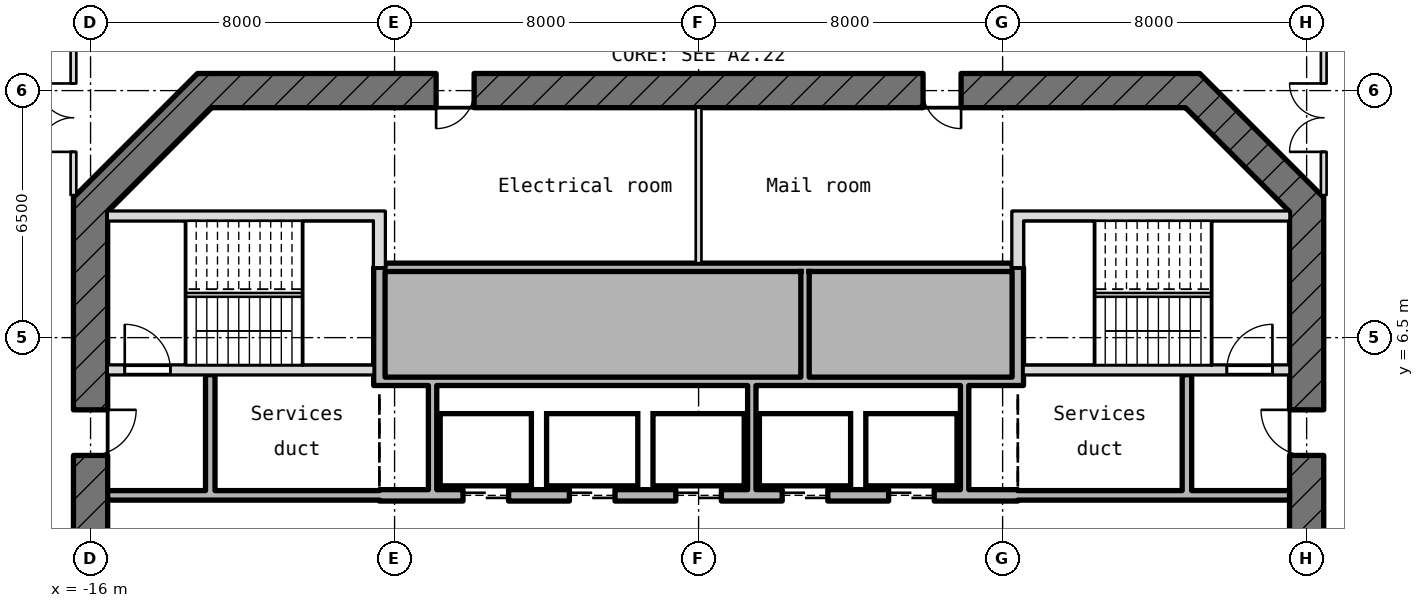
"""IFC4 building model, lengths in metres.
Left out: names, types, materials, properties, quantities, classifications, styles, units other than length and angle.
Written with IfcOpenShell. Run it as: python <this file> out.ifc"""

import sys

from ifc_helpers import new_model, si_unit, direction, frame, frame_2d, origin, place, context, subcontext, project, spatial, rectangle, extrude, element, fill, save


model = new_model("IFC4")
c1 = context("Model", 3, precision=1e-05, world=origin(), true_north=direction((0.0, 1.0)))
c2 = subcontext(c1, "Body", "Model", "MODEL_VIEW")
j1 = project(units=[si_unit("LENGTHUNIT", "METRE"), si_unit("PLANEANGLEUNIT", "RADIAN")], contexts=[c1])
p1 = place(None, origin())
s1 = spatial("IfcSite", under=j1, at=p1, CompositionType="ELEMENT")
p2 = place(p1, origin())
s2 = spatial("IfcBuilding", under=s1, at=p2, CompositionType="ELEMENT")
p3 = place(p2, frame((0.0, 0.0, 235.75)))
s3 = spatial("IfcBuildingStorey", under=s2, at=p3, CompositionType="ELEMENT", Elevation=235.75)
p4 = place(p3, frame((-15.003, 20.519, 0.0), z_axis=(0.0, 0.0, 1.0), x_axis=(-0.765786072148, -0.643095398603, 0.0)))
e1 = element("IfcWall", 1, at=p4, inside=s3, PredefinedType="SOLIDWALL", context=c2, shape_type="SweptSolid", body=[
    extrude(rectangle(XDim=10.897, YDim=0.3, at=frame_2d((5.448, 0.0))), origin(), (0.0, 0.0, 1.0), 3.97),
])
p5 = place(p4, frame((7.197, 0.0, 0.0)))
e2 = element("IfcOpeningElement", 2, at=p5, cuts=e1, PredefinedType="OPENING", context=c2, shape_type="SweptSolid", body=[
    extrude(rectangle(XDim=1.8, YDim=2.4, at=frame_2d((0.9, 1.2))), frame((0.0, 0.16, 0.0), z_axis=(0.0, -1.0, 0.0), x_axis=(1.0, 0.0, 0.0)), (0.0, 0.0, 1.0), 0.32),
])
p6 = place(p4, frame((4.597, 0.0, 0.9)))
e3 = element("IfcOpeningElement", 3, at=p6, cuts=e1, PredefinedType="OPENING", context=c2, shape_type="SweptSolid", body=[
    extrude(rectangle(XDim=2.0, YDim=1.5, at=frame_2d((1.0, 0.75))), frame((0.0, 0.16, 0.0), z_axis=(0.0, -1.0, 0.0), x_axis=(1.0, 0.0, 0.0)), (0.0, 0.0, 1.0), 0.32),
])
p7 = place(p3, frame((16.0, -10.186, -0.18), z_axis=(0.0, 0.0, 1.0), x_axis=(0.0, 1.0, 0.0)))
e4 = element("IfcWall", 4, at=p7, inside=s3, PredefinedType="SHEAR", context=c2, shape_type="SweptSolid", body=[
    extrude(rectangle(XDim=20.373, YDim=0.9, at=frame_2d((10.186, 0.0))), origin(), (0.0, 0.0, 1.0), 4.15),
])
p8 = place(p7, frame((8.986, 0.0, 0.18)))
e5 = element("IfcOpeningElement", 5, at=p8, cuts=e4, PredefinedType="OPENING", context=c2, shape_type="SweptSolid", body=[
    extrude(rectangle(XDim=2.4, YDim=2.1, at=frame_2d((1.2, 1.05))), frame((0.0, 0.46, 0.0), z_axis=(0.0, -1.0, 0.0), x_axis=(1.0, 0.0, 0.0)), (0.0, 0.0, 1.0), 0.92),
])
p9 = place(p7, frame((13.586, 0.0, 0.18)))
e6 = element("IfcOpeningElement", 6, at=p9, cuts=e4, PredefinedType="OPENING", context=c2, shape_type="SweptSolid", body=[
    extrude(rectangle(XDim=1.2, YDim=2.1, at=frame_2d((0.6, 1.05))), frame((0.0, 0.46, 0.0), z_axis=(0.0, -1.0, 0.0), x_axis=(1.0, 0.0, 0.0)), (0.0, 0.0, 1.0), 0.92),
])
p10 = place(p7, frame((2.4, 0.0, 0.18)))
e7 = element("IfcOpeningElement", 7, at=p10, cuts=e4, PredefinedType="OPENING", context=c2, shape_type="SweptSolid", body=[
    extrude(rectangle(XDim=1.2, YDim=2.1, at=frame_2d((0.6, 1.05))), frame((0.0, 0.46, 0.0), z_axis=(0.0, -1.0, 0.0), x_axis=(1.0, 0.0, 0.0)), (0.0, 0.0, 1.0), 0.92),
])
p11 = place(p3, frame((16.132, 9.868, -0.18), z_axis=(0.0, 0.0, 1.0), x_axis=(-0.707106781187, 0.707106781187, 0.0)))
e8 = element("IfcWall", 8, at=p11, inside=s3, PredefinedType="SHEAR", context=c2, shape_type="SweptSolid", body=[
    extrude(rectangle(XDim=4.615, YDim=0.9, at=frame_2d((2.308, 0.0))), origin(), (0.0, 0.0, 1.0), 4.15),
])
p12 = place(p3, frame((13.186, 13.0, -0.18), z_axis=(0.0, 0.0, 1.0), x_axis=(-1.0, 0.0, 0.0)))
e9 = element("IfcWall", 9, at=p12, inside=s3, PredefinedType="SHEAR", context=c2, shape_type="SweptSolid", body=[
    extrude(rectangle(XDim=26.373, YDim=0.9, at=frame_2d((13.186, 0.0))), origin(), (0.0, 0.0, 1.0), 4.15),
])
p13 = place(p12, frame((19.094, 0.0, 0.18)))
e10 = element("IfcOpeningElement", 10, at=p13, cuts=e9, PredefinedType="OPENING", context=c2, shape_type="SweptSolid", body=[
    extrude(rectangle(XDim=1.0, YDim=2.1, at=frame_2d((0.5, 1.05))), frame((0.0, 0.46, 0.0), z_axis=(0.0, -1.0, 0.0), x_axis=(1.0, 0.0, 0.0)), (0.0, 0.0, 1.0), 0.92),
])
p14 = place(p12, frame((6.279, 0.0, 0.18)))
e11 = element("IfcOpeningElement", 11, at=p14, cuts=e9, PredefinedType="OPENING", context=c2, shape_type="SweptSolid", body=[
    extrude(rectangle(XDim=1.0, YDim=2.1, at=frame_2d((0.5, 1.05))), frame((0.0, 0.46, 0.0), z_axis=(0.0, -1.0, 0.0), x_axis=(1.0, 0.0, 0.0)), (0.0, 0.0, 1.0), 0.92),
])
p15 = place(p3, frame((-12.868, 13.132, -0.18), z_axis=(0.0, 0.0, 1.0), x_axis=(-0.707106781187, -0.707106781187, 0.0)))
e12 = element("IfcWall", 12, at=p15, inside=s3, PredefinedType="SHEAR", context=c2, shape_type="SweptSolid", body=[
    extrude(rectangle(XDim=4.615, YDim=0.9, at=frame_2d((2.308, 0.0))), origin(), (0.0, 0.0, 1.0), 4.15),
])
p16 = place(p3, frame((-16.0, 10.186, -0.18), z_axis=(0.0, 0.0, 1.0), x_axis=(0.0, -1.0, 0.0)))
e13 = element("IfcWall", 13, at=p16, inside=s3, PredefinedType="SHEAR", context=c2, shape_type="SweptSolid", body=[
    extrude(rectangle(XDim=20.373, YDim=0.9, at=frame_2d((10.186, 0.0))), origin(), (0.0, 0.0, 1.0), 4.15),
])
p17 = place(p16, frame((8.986, 0.0, 0.18)))
e14 = element("IfcOpeningElement", 14, at=p17, cuts=e13, PredefinedType="OPENING", context=c2, shape_type="SweptSolid", body=[
    extrude(rectangle(XDim=2.4, YDim=2.1, at=frame_2d((1.2, 1.05))), frame((0.0, 0.46, 0.0), z_axis=(0.0, -1.0, 0.0), x_axis=(1.0, 0.0, 0.0)), (0.0, 0.0, 1.0), 0.92),
])
p18 = place(p16, frame((5.586, 0.0, 0.18)))
e15 = element("IfcOpeningElement", 15, at=p18, cuts=e13, PredefinedType="OPENING", context=c2, shape_type="SweptSolid", body=[
    extrude(rectangle(XDim=1.2, YDim=2.1, at=frame_2d((0.6, 1.05))), frame((0.0, 0.46, 0.0), z_axis=(0.0, -1.0, 0.0), x_axis=(1.0, 0.0, 0.0)), (0.0, 0.0, 1.0), 0.92),
])
p19 = place(p3, frame((-15.55, 2.35, 0.0), z_axis=(0.0, 0.0, 1.0), x_axis=(1.0, 0.0, 0.0)))
e16 = element("IfcWall", 16, at=p19, inside=s3, PredefinedType="STANDARD", context=c2, shape_type="SweptSolid", body=[
    extrude(rectangle(XDim=7.15, YDim=0.25, at=frame_2d((3.575, 0.0))), origin(), (0.0, 0.0, 1.0), 3.97),
])
p20 = place(p3, frame((-8.4, 2.35, -0.18), z_axis=(0.0, 0.0, 1.0), x_axis=(1.0, 0.0, 0.0)))
e17 = element("IfcWall", 17, at=p20, inside=s3, PredefinedType="SHEAR", context=c2, shape_type="SweptSolid", body=[
    extrude(rectangle(XDim=16.8, YDim=0.3, at=frame_2d((8.4, 0.0))), origin(), (0.0, 0.0, 1.0), 4.15),
])
p21 = place(p20, frame((2.2, 0.0, 0.18)))
e18 = element("IfcOpeningElement", 18, at=p21, cuts=e17, PredefinedType="OPENING", context=c2, shape_type="SweptSolid", body=[
    extrude(rectangle(XDim=1.2, YDim=2.1, at=frame_2d((0.6, 1.05))), frame((0.0, 0.16, 0.0), z_axis=(0.0, -1.0, 0.0), x_axis=(1.0, 0.0, 0.0)), (0.0, 0.0, 1.0), 0.32),
])
p22 = place(p20, frame((5.0, 0.0, 0.18)))
e19 = element("IfcOpeningElement", 19, at=p22, cuts=e17, PredefinedType="OPENING", context=c2, shape_type="SweptSolid", body=[
    extrude(rectangle(XDim=1.2, YDim=2.1, at=frame_2d((0.6, 1.05))), frame((0.0, 0.16, 0.0), z_axis=(0.0, -1.0, 0.0), x_axis=(1.0, 0.0, 0.0)), (0.0, 0.0, 1.0), 0.32),
])
p23 = place(p20, frame((7.8, 0.0, 0.18)))
e20 = element("IfcOpeningElement", 20, at=p23, cuts=e17, PredefinedType="OPENING", context=c2, shape_type="SweptSolid", body=[
    extrude(rectangle(XDim=1.2, YDim=2.1, at=frame_2d((0.6, 1.05))), frame((0.0, 0.16, 0.0), z_axis=(0.0, -1.0, 0.0), x_axis=(1.0, 0.0, 0.0)), (0.0, 0.0, 1.0), 0.32),
])
p24 = place(p20, frame((10.6, 0.0, 0.18)))
e21 = element("IfcOpeningElement", 21, at=p24, cuts=e17, PredefinedType="OPENING", context=c2, shape_type="SweptSolid", body=[
    extrude(rectangle(XDim=1.2, YDim=2.1, at=frame_2d((0.6, 1.05))), frame((0.0, 0.16, 0.0), z_axis=(0.0, -1.0, 0.0), x_axis=(1.0, 0.0, 0.0)), (0.0, 0.0, 1.0), 0.32),
])
p25 = place(p20, frame((13.4, 0.0, 0.18)))
e22 = element("IfcOpeningElement", 22, at=p25, cuts=e17, PredefinedType="OPENING", context=c2, shape_type="SweptSolid", body=[
    extrude(rectangle(XDim=1.2, YDim=2.1, at=frame_2d((0.6, 1.05))), frame((0.0, 0.16, 0.0), z_axis=(0.0, -1.0, 0.0), x_axis=(1.0, 0.0, 0.0)), (0.0, 0.0, 1.0), 0.32),
])
p26 = place(p3, frame((8.4, 2.35, 0.0), z_axis=(0.0, 0.0, 1.0), x_axis=(1.0, 0.0, 0.0)))
e23 = element("IfcWall", 23, at=p26, inside=s3, PredefinedType="STANDARD", context=c2, shape_type="SweptSolid", body=[
    extrude(rectangle(XDim=7.15, YDim=0.25, at=frame_2d((3.575, 0.0))), origin(), (0.0, 0.0, 1.0), 3.97),
])
p27 = place(p3, frame((-8.25, 5.35, 0.0), z_axis=(0.0, 0.0, 1.0), x_axis=(1.0, 0.0, 0.0)))
e24 = element("IfcWall", 24, at=p27, inside=s3, PredefinedType="STANDARD", context=c2, shape_type="SweptSolid", body=[
    extrude(rectangle(XDim=16.5, YDim=0.22, at=frame_2d((8.25, 0.0))), origin(), (0.0, 0.0, 1.0), 3.97),
])
p28 = place(p3, frame((-15.55, 5.65, -0.18), z_axis=(0.0, 0.0, 1.0), x_axis=(1.0, 0.0, 0.0)))
e25 = element("IfcWall", 25, at=p28, inside=s3, PredefinedType="SHEAR", context=c2, shape_type="SweptSolid", body=[
    extrude(rectangle(XDim=7.0, YDim=0.25, at=frame_2d((3.5, 0.0))), origin(), (0.0, 0.0, 1.0), 4.15),
])
p29 = place(p28, frame((0.45, 0.0, 0.18)))
e26 = element("IfcOpeningElement", 26, at=p29, cuts=e25, PredefinedType="OPENING", context=c2, shape_type="SweptSolid", body=[
    extrude(rectangle(XDim=1.2, YDim=2.1, at=frame_2d((0.6, 1.05))), frame((0.0, 0.135, 0.0), z_axis=(0.0, -1.0, 0.0), x_axis=(1.0, 0.0, 0.0)), (0.0, 0.0, 1.0), 0.27),
])
p30 = place(p3, frame((8.55, 5.65, -0.18), z_axis=(0.0, 0.0, 1.0), x_axis=(1.0, 0.0, 0.0)))
e27 = element("IfcWall", 27, at=p30, inside=s3, PredefinedType="SHEAR", context=c2, shape_type="SweptSolid", body=[
    extrude(rectangle(XDim=7.0, YDim=0.25, at=frame_2d((3.5, 0.0))), origin(), (0.0, 0.0, 1.0), 4.15),
])
p31 = place(p30, frame((5.35, 0.0, 0.18)))
e28 = element("IfcOpeningElement", 28, at=p31, cuts=e27, PredefinedType="OPENING", context=c2, shape_type="SweptSolid", body=[
    extrude(rectangle(XDim=1.2, YDim=2.1, at=frame_2d((0.6, 1.05))), frame((0.0, 0.135, 0.0), z_axis=(0.0, -1.0, 0.0), x_axis=(1.0, 0.0, 0.0)), (0.0, 0.0, 1.0), 0.27),
])
p32 = place(p3, frame((-8.25, 8.35, 0.0), z_axis=(0.0, 0.0, 1.0), x_axis=(1.0, 0.0, 0.0)))
e29 = element("IfcWall", 29, at=p32, inside=s3, PredefinedType="STANDARD", context=c2, shape_type="SweptSolid", body=[
    extrude(rectangle(XDim=16.5, YDim=0.22, at=frame_2d((8.25, 0.0))), origin(), (0.0, 0.0, 1.0), 3.97),
])
for number, where, z_axis, x_axis in (
    (30, (-15.55, 9.7, -0.18), (0.0, 0.0, 1.0), (1.0, 0.0, 0.0)),
    (31, (8.55, 9.7, -0.18), (0.0, 0.0, 1.0), (1.0, 0.0, 0.0)),
):
    element("IfcWall", number, at=place(p3, frame(where, z_axis=z_axis, x_axis=x_axis)), inside=s3, PredefinedType="SHEAR", context=c2, shape_type="SweptSolid", body=[
        extrude(rectangle(XDim=7.0, YDim=0.25, at=frame_2d((3.5, 0.0))), origin(), (0.0, 0.0, 1.0), 4.15),
    ])
p33 = place(p3, frame((-12.85, 2.475, 0.0), z_axis=(0.0, 0.0, 1.0), x_axis=(0.0, 1.0, 0.0)))
e32 = element("IfcWall", 32, at=p33, inside=s3, PredefinedType="STANDARD", context=c2, shape_type="SweptSolid", body=[
    extrude(rectangle(XDim=3.05, YDim=0.25, at=frame_2d((1.525, 0.0))), origin(), (0.0, 0.0, 1.0), 3.97),
])
p34 = place(p3, frame((-8.4, 5.24, -0.18), z_axis=(0.0, 0.0, 1.0), x_axis=(0.0, 1.0, 0.0)))
e33 = element("IfcWall", 33, at=p34, inside=s3, PredefinedType="SHEAR", context=c2, shape_type="SweptSolid", body=[
    extrude(rectangle(XDim=3.11, YDim=0.3, at=frame_2d((1.555, 0.0))), origin(), (0.0, 0.0, 1.0), 4.15),
])
p35 = place(p3, frame((-8.4, 8.35, -0.18), z_axis=(0.0, 0.0, 1.0), x_axis=(0.0, 1.0, 0.0)))
e34 = element("IfcWall", 34, at=p35, inside=s3, PredefinedType="SHEAR", context=c2, shape_type="SweptSolid", body=[
    extrude(rectangle(XDim=1.475, YDim=0.3, at=frame_2d((0.737, 0.0))), origin(), (0.0, 0.0, 1.0), 4.15),
])
p36 = place(p3, frame((-7.0, 2.5, 0.0), z_axis=(0.0, 0.0, 1.0), x_axis=(0.0, 1.0, 0.0)))
e35 = element("IfcWall", 35, at=p36, inside=s3, PredefinedType="STANDARD", context=c2, shape_type="SweptSolid", body=[
    extrude(rectangle(XDim=2.74, YDim=0.22, at=frame_2d((1.37, 0.0))), origin(), (0.0, 0.0, 1.0), 3.97),
])
p37 = place(p3, frame((0.0, 8.46, 0.0), z_axis=(0.0, 0.0, 1.0), x_axis=(0.0, 1.0, 0.0)))
e36 = element("IfcWall", 36, at=p37, inside=s3, PredefinedType="PARTITIONING", context=c2, shape_type="SweptSolid", body=[
    extrude(rectangle(XDim=4.09, YDim=0.15, at=frame_2d((2.045, 0.0))), origin(), (0.0, 0.0, 1.0), 3.97),
])
p38 = place(p3, frame((1.4, 2.5, 0.0), z_axis=(0.0, 0.0, 1.0), x_axis=(0.0, 1.0, 0.0)))
e37 = element("IfcWall", 37, at=p38, inside=s3, PredefinedType="STANDARD", context=c2, shape_type="SweptSolid", body=[
    extrude(rectangle(XDim=2.74, YDim=0.22, at=frame_2d((1.37, 0.0))), origin(), (0.0, 0.0, 1.0), 3.97),
])
p39 = place(p3, frame((2.8, 5.46, 0.0), z_axis=(0.0, 0.0, 1.0), x_axis=(0.0, 1.0, 0.0)))
e38 = element("IfcWall", 38, at=p39, inside=s3, PredefinedType="STANDARD", context=c2, shape_type="SweptSolid", body=[
    extrude(rectangle(XDim=2.78, YDim=0.22, at=frame_2d((1.39, 0.0))), origin(), (0.0, 0.0, 1.0), 3.97),
])
p40 = place(p3, frame((7.0, 2.5, 0.0), z_axis=(0.0, 0.0, 1.0), x_axis=(0.0, 1.0, 0.0)))
e39 = element("IfcWall", 39, at=p40, inside=s3, PredefinedType="STANDARD", context=c2, shape_type="SweptSolid", body=[
    extrude(rectangle(XDim=2.74, YDim=0.22, at=frame_2d((1.37, 0.0))), origin(), (0.0, 0.0, 1.0), 3.97),
])
p41 = place(p3, frame((8.4, 5.24, -0.18), z_axis=(0.0, 0.0, 1.0), x_axis=(0.0, 1.0, 0.0)))
e40 = element("IfcWall", 40, at=p41, inside=s3, PredefinedType="SHEAR", context=c2, shape_type="SweptSolid", body=[
    extrude(rectangle(XDim=3.11, YDim=0.3, at=frame_2d((1.555, 0.0))), origin(), (0.0, 0.0, 1.0), 4.15),
])
p42 = place(p3, frame((8.4, 8.35, -0.18), z_axis=(0.0, 0.0, 1.0), x_axis=(0.0, 1.0, 0.0)))
e41 = element("IfcWall", 41, at=p42, inside=s3, PredefinedType="SHEAR", context=c2, shape_type="SweptSolid", body=[
    extrude(rectangle(XDim=1.475, YDim=0.3, at=frame_2d((0.737, 0.0))), origin(), (0.0, 0.0, 1.0), 4.15),
])
p43 = place(p3, frame((12.85, 2.475, 0.0), z_axis=(0.0, 0.0, 1.0), x_axis=(0.0, 1.0, 0.0)))
e42 = element("IfcWall", 42, at=p43, inside=s3, PredefinedType="STANDARD", context=c2, shape_type="SweptSolid", body=[
    extrude(rectangle(XDim=3.05, YDim=0.25, at=frame_2d((1.525, 0.0))), origin(), (0.0, 0.0, 1.0), 3.97),
])
p44 = place(p3, frame((-16.45, 10.25, 0.0), z_axis=(0.0, 0.0, 1.0), x_axis=(0.0, 1.0, 0.0)))
e43 = element("IfcWall", 43, at=p44, inside=s3, PredefinedType="PARTITIONING", context=c2, shape_type="SweptSolid", body=[
    extrude(rectangle(XDim=7.037, YDim=0.15, at=frame_2d((3.518, 0.0))), origin(), (0.0, 0.0, 1.0), 3.97),
])
p45 = place(p44, frame((1.138, 0.0, 0.0)))
e44 = element("IfcOpeningElement", 44, at=p45, cuts=e43, PredefinedType="OPENING", context=c2, shape_type="SweptSolid", body=[
    extrude(rectangle(XDim=1.8, YDim=2.1, at=frame_2d((0.9, 1.05))), frame((0.0, 0.085, 0.0), z_axis=(0.0, -1.0, 0.0), x_axis=(1.0, 0.0, 0.0)), (0.0, 0.0, 1.0), 0.17),
])
p46 = place(p3, frame((16.45, 10.25, 0.0), z_axis=(0.0, 0.0, 1.0), x_axis=(0.0, 1.0, 0.0)))
e45 = element("IfcWall", 45, at=p46, inside=s3, PredefinedType="PARTITIONING", context=c2, shape_type="SweptSolid", body=[
    extrude(rectangle(XDim=7.037, YDim=0.15, at=frame_2d((3.518, 0.0))), origin(), (0.0, 0.0, 1.0), 3.97),
])
p47 = place(p46, frame((1.138, 0.0, 0.0)))
e46 = element("IfcOpeningElement", 46, at=p47, cuts=e45, PredefinedType="OPENING", context=c2, shape_type="SweptSolid", body=[
    extrude(rectangle(XDim=1.8, YDim=2.1, at=frame_2d((0.9, 1.05))), frame((0.0, 0.085, 0.0), z_axis=(0.0, -1.0, 0.0), x_axis=(1.0, 0.0, 0.0)), (0.0, 0.0, 1.0), 0.17),
])
p48 = place(p21, origin())
e47 = element("IfcDoor", 47, at=p48, inside=s3, OperationType="DOUBLE_DOOR_SLIDING", PredefinedType="DOOR", context=c2, shape_type="SweptSolid", body=[
    extrude(rectangle(XDim=1.2, YDim=2.1, at=frame_2d((0.6, 1.05))), frame((0.0, 0.025, 0.0), z_axis=(0.0, -1.0, 0.0), x_axis=(1.0, 0.0, 0.0)), (0.0, 0.0, 1.0), 0.05),
])
fill(e18, e47)
p49 = place(p22, origin())
e48 = element("IfcDoor", 48, at=p49, inside=s3, OperationType="DOUBLE_DOOR_SLIDING", PredefinedType="DOOR", context=c2, shape_type="SweptSolid", body=[
    extrude(rectangle(XDim=1.2, YDim=2.1, at=frame_2d((0.6, 1.05))), frame((0.0, 0.025, 0.0), z_axis=(0.0, -1.0, 0.0), x_axis=(1.0, 0.0, 0.0)), (0.0, 0.0, 1.0), 0.05),
])
fill(e19, e48)
p50 = place(p23, origin())
e49 = element("IfcDoor", 49, at=p50, inside=s3, OperationType="DOUBLE_DOOR_SLIDING", PredefinedType="DOOR", context=c2, shape_type="SweptSolid", body=[
    extrude(rectangle(XDim=1.2, YDim=2.1, at=frame_2d((0.6, 1.05))), frame((0.0, 0.025, 0.0), z_axis=(0.0, -1.0, 0.0), x_axis=(1.0, 0.0, 0.0)), (0.0, 0.0, 1.0), 0.05),
])
fill(e20, e49)
p51 = place(p24, origin())
e50 = element("IfcDoor", 50, at=p51, inside=s3, OperationType="DOUBLE_DOOR_SLIDING", PredefinedType="DOOR", context=c2, shape_type="SweptSolid", body=[
    extrude(rectangle(XDim=1.2, YDim=2.1, at=frame_2d((0.6, 1.05))), frame((0.0, 0.025, 0.0), z_axis=(0.0, -1.0, 0.0), x_axis=(1.0, 0.0, 0.0)), (0.0, 0.0, 1.0), 0.05),
])
fill(e21, e50)
p52 = place(p25, origin())
e51 = element("IfcDoor", 51, at=p52, inside=s3, OperationType="DOUBLE_DOOR_SLIDING", PredefinedType="DOOR", context=c2, shape_type="SweptSolid", body=[
    extrude(rectangle(XDim=1.2, YDim=2.1, at=frame_2d((0.6, 1.05))), frame((0.0, 0.025, 0.0), z_axis=(0.0, -1.0, 0.0), x_axis=(1.0, 0.0, 0.0)), (0.0, 0.0, 1.0), 0.05),
])
fill(e22, e51)
p53 = place(p29, origin())
e52 = element("IfcDoor", 52, at=p53, inside=s3, OperationType="SINGLE_SWING_RIGHT", PredefinedType="DOOR", context=c2, shape_type="SweptSolid", body=[
    extrude(rectangle(XDim=1.2, YDim=2.1, at=frame_2d((0.6, 1.05))), frame((0.0, 0.025, 0.0), z_axis=(0.0, -1.0, 0.0), x_axis=(1.0, 0.0, 0.0)), (0.0, 0.0, 1.0), 0.05),
])
fill(e26, e52)
p54 = place(p31, origin())
e53 = element("IfcDoor", 53, at=p54, inside=s3, OperationType="SINGLE_SWING_RIGHT", PredefinedType="DOOR", context=c2, shape_type="SweptSolid", body=[
    extrude(rectangle(XDim=1.2, YDim=2.1, at=frame_2d((0.6, 1.05))), frame((0.0, 0.025, 0.0), z_axis=(0.0, -1.0, 0.0), x_axis=(1.0, 0.0, 0.0)), (0.0, 0.0, 1.0), 0.05),
])
fill(e28, e53)
p55 = place(p18, origin())
e54 = element("IfcDoor", 54, at=p55, inside=s3, OperationType="SINGLE_SWING_RIGHT", PredefinedType="DOOR", context=c2, shape_type="SweptSolid", body=[
    extrude(rectangle(XDim=1.2, YDim=2.1, at=frame_2d((0.6, 1.05))), frame((0.0, 0.025, 0.0), z_axis=(0.0, -1.0, 0.0), x_axis=(1.0, 0.0, 0.0)), (0.0, 0.0, 1.0), 0.05),
])
fill(e15, e54)
p56 = place(p9, origin())
e55 = element("IfcDoor", 55, at=p56, inside=s3, OperationType="SINGLE_SWING_RIGHT", PredefinedType="DOOR", context=c2, shape_type="SweptSolid", body=[
    extrude(rectangle(XDim=1.2, YDim=2.1, at=frame_2d((0.6, 1.05))), frame((0.0, 0.025, 0.0), z_axis=(0.0, -1.0, 0.0), x_axis=(1.0, 0.0, 0.0)), (0.0, 0.0, 1.0), 0.05),
])
fill(e6, e55)
p57 = place(p13, origin())
e56 = element("IfcDoor", 56, at=p57, inside=s3, OperationType="SINGLE_SWING_RIGHT", PredefinedType="DOOR", context=c2, shape_type="SweptSolid", body=[
    extrude(rectangle(XDim=1.0, YDim=2.1, at=frame_2d((0.5, 1.05))), frame((0.0, 0.025, 0.0), z_axis=(0.0, -1.0, 0.0), x_axis=(1.0, 0.0, 0.0)), (0.0, 0.0, 1.0), 0.05),
])
fill(e10, e56)
p58 = place(p14, origin())
e57 = element("IfcDoor", 57, at=p58, inside=s3, OperationType="SINGLE_SWING_RIGHT", PredefinedType="DOOR", context=c2, shape_type="SweptSolid", body=[
    extrude(rectangle(XDim=1.0, YDim=2.1, at=frame_2d((0.5, 1.05))), frame((0.0, 0.025, 0.0), z_axis=(0.0, -1.0, 0.0), x_axis=(1.0, 0.0, 0.0)), (0.0, 0.0, 1.0), 0.05),
])
fill(e11, e57)
p59 = place(p45, origin())
e58 = element("IfcDoor", 58, at=p59, inside=s3, OperationType="DOUBLE_DOOR_SINGLE_SWING", PredefinedType="DOOR", context=c2, shape_type="SweptSolid", body=[
    extrude(rectangle(XDim=1.8, YDim=2.1, at=frame_2d((0.9, 1.05))), frame((0.0, 0.025, 0.0), z_axis=(0.0, -1.0, 0.0), x_axis=(1.0, 0.0, 0.0)), (0.0, 0.0, 1.0), 0.05),
])
fill(e44, e58)
p60 = place(p47, origin())
e59 = element("IfcDoor", 59, at=p60, inside=s3, OperationType="DOUBLE_DOOR_SINGLE_SWING", PredefinedType="DOOR", context=c2, shape_type="SweptSolid", body=[
    extrude(rectangle(XDim=1.8, YDim=2.1, at=frame_2d((0.9, 1.05))), frame((0.0, 0.025, 0.0), z_axis=(0.0, -1.0, 0.0), x_axis=(1.0, 0.0, 0.0)), (0.0, 0.0, 1.0), 0.05),
])
fill(e46, e59)
save(model, sys.argv[1])
